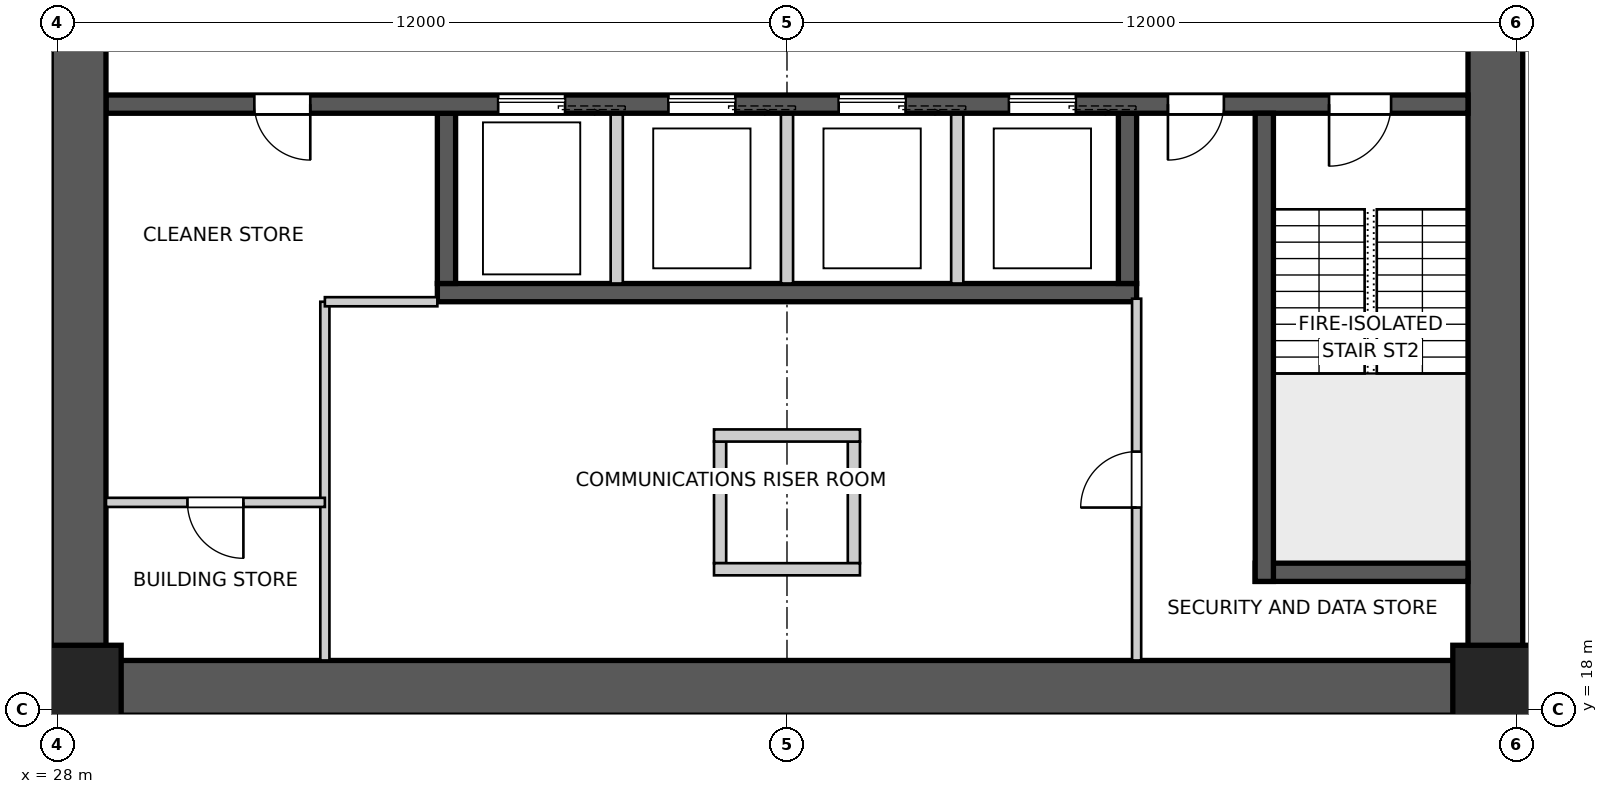
"""IFC4 building model, lengths in metres.
Left out: names, types, materials, properties, quantities, classifications, styles, units other than length and angle.
Written with IfcOpenShell. Run it as: python <this file> out.ifc"""

import sys

from ifc_helpers import new_model, si_unit, direction, frame, frame_2d, origin, origin_2d, place, context, subcontext, project, spatial, polyline, rectangle, outline, extrude, element, fill, save


model = new_model("IFC4")
c1 = context("Model", 3, precision=1e-05, world=origin(), true_north=direction((0.0, 1.0)))
c2 = subcontext(c1, "Body", "Model", "MODEL_VIEW")
j1 = project(units=[si_unit("LENGTHUNIT", "METRE"), si_unit("PLANEANGLEUNIT", "RADIAN")], contexts=[c1])
p1 = place(None, origin())
s1 = spatial("IfcSite", under=j1, at=p1, CompositionType="ELEMENT")
p2 = place(p1, origin())
s2 = spatial("IfcBuilding", under=s1, at=p2, CompositionType="ELEMENT")
p3 = place(p2, frame((0.0, 0.0, -7.4)))
s3 = spatial("IfcBuildingStorey", under=s2, at=p3, CompositionType="ELEMENT", Elevation=-7.4)
p4 = place(p3, frame((51.2, 18.35, -0.4), z_axis=(0.0, 0.0, 1.0), x_axis=(-1.0, 0.0, 0.0)))
e1 = element("IfcWall", 1, at=p4, inside=s3, PredefinedType="SHEAR", context=c2, shape_type="SweptSolid", body=[
    extrude(outline(polyline([(0.0, -0.45), (22.4, -0.45), (22.4, -0.025), (22.85, -0.025), (22.85, 0.025), (22.4, 0.025), (22.4, 0.45), (0.0, 0.45), (0.0, 0.025), (-0.45, 0.025), (-0.45, -0.025), (0.0, -0.025), (0.0, -0.45)])), origin(), (0.0, 0.0, 1.0), 4.1),
])
p5 = place(p3, frame((51.65, 18.8, -0.4), z_axis=(0.0, 0.0, 1.0), x_axis=(0.0, 1.0, 0.0)))
e2 = element("IfcWall", 2, at=p5, inside=s3, PredefinedType="SHEAR", context=c2, shape_type="SweptSolid", body=[
    extrude(outline(polyline([(0.0, -0.45), (22.4, -0.45), (22.4, -0.025), (22.85, -0.025), (22.85, 0.025), (22.4, 0.025), (22.4, 0.45), (0.0, 0.45), (0.0, 0.025), (-0.45, 0.025), (-0.45, -0.025), (0.0, -0.025), (0.0, -0.45)])), origin(), (0.0, 0.0, 1.0), 4.1),
])
p6 = place(p5, frame((11.14, 0.0, 0.4)))
e3 = element("IfcOpeningElement", 3, at=p6, cuts=e2, PredefinedType="OPENING", context=c2, shape_type="SweptSolid", body=[
    extrude(rectangle(XDim=1.02, YDim=2.4, at=frame_2d((0.51, 1.2))), frame((0.0, 0.46, 0.0), z_axis=(0.0, -1.0, 0.0), x_axis=(1.0, 0.0, 0.0)), (0.0, 0.0, 1.0), 0.92),
])
p7 = place(p3, frame((28.35, 41.2, -0.4), z_axis=(0.0, 0.0, 1.0), x_axis=(0.0, -1.0, 0.0)))
e4 = element("IfcWall", 4, at=p7, inside=s3, PredefinedType="SHEAR", context=c2, shape_type="SweptSolid", body=[
    extrude(outline(polyline([(0.0, -0.45), (22.4, -0.45), (22.4, -0.025), (22.85, -0.025), (22.85, 0.025), (22.4, 0.025), (22.4, 0.45), (0.0, 0.45), (0.0, 0.025), (-0.45, 0.025), (-0.45, -0.025), (0.0, -0.025), (0.0, -0.45)])), origin(), (0.0, 0.0, 1.0), 4.1),
])
p8 = place(p7, frame((11.14, 0.0, 0.4)))
e5 = element("IfcOpeningElement", 5, at=p8, cuts=e4, PredefinedType="OPENING", context=c2, shape_type="SweptSolid", body=[
    extrude(rectangle(XDim=1.02, YDim=2.4, at=frame_2d((0.51, 1.2))), frame((0.0, 0.46, 0.0), z_axis=(0.0, -1.0, 0.0), x_axis=(1.0, 0.0, 0.0)), (0.0, 0.0, 1.0), 0.92),
])
p9 = place(p3, frame((51.2, 27.95, -0.4), z_axis=(0.0, 0.0, 1.0), x_axis=(-1.0, 0.0, 0.0)))
e6 = element("IfcWall", 6, at=p9, inside=s3, PredefinedType="SHEAR", context=c2, shape_type="SweptSolid", body=[
    extrude(rectangle(XDim=22.4, YDim=0.3, at=frame_2d((11.2, 0.0))), origin(), (0.0, 0.0, 1.0), 4.1),
])
p10 = place(p9, frame((19.04, 0.0, 0.4)))
e7 = element("IfcOpeningElement", 7, at=p10, cuts=e6, PredefinedType="OPENING", context=c2, shape_type="SweptSolid", body=[
    extrude(rectangle(XDim=0.92, YDim=2.1, at=frame_2d((0.46, 1.05))), frame((0.0, 0.16, 0.0), z_axis=(0.0, -1.0, 0.0), x_axis=(1.0, 0.0, 0.0)), (0.0, 0.0, 1.0), 0.32),
])
p11 = place(p9, frame((1.265, 0.0, 0.4)))
e8 = element("IfcOpeningElement", 8, at=p11, cuts=e6, PredefinedType="OPENING", context=c2, shape_type="SweptSolid", body=[
    extrude(rectangle(XDim=1.02, YDim=2.1, at=frame_2d((0.51, 1.05))), frame((0.0, 0.16, 0.0), z_axis=(0.0, -1.0, 0.0), x_axis=(1.0, 0.0, 0.0)), (0.0, 0.0, 1.0), 0.32),
])
p12 = place(p9, frame((4.015, 0.0, 0.4)))
e9 = element("IfcOpeningElement", 9, at=p12, cuts=e6, PredefinedType="OPENING", context=c2, shape_type="SweptSolid", body=[
    extrude(rectangle(XDim=0.92, YDim=2.1, at=frame_2d((0.46, 1.05))), frame((0.0, 0.16, 0.0), z_axis=(0.0, -1.0, 0.0), x_axis=(1.0, 0.0, 0.0)), (0.0, 0.0, 1.0), 0.32),
])
p13 = place(p9, frame((6.45, 0.0, 0.4)))
e10 = element("IfcOpeningElement", 10, at=p13, cuts=e6, PredefinedType="OPENING", context=c2, shape_type="SweptSolid", body=[
    extrude(rectangle(XDim=1.1, YDim=2.1, at=frame_2d((0.55, 1.05))), frame((0.0, 0.16, 0.0), z_axis=(0.0, -1.0, 0.0), x_axis=(1.0, 0.0, 0.0)), (0.0, 0.0, 1.0), 0.32),
])
p14 = place(p9, frame((9.25, 0.0, 0.4)))
e11 = element("IfcOpeningElement", 11, at=p14, cuts=e6, PredefinedType="OPENING", context=c2, shape_type="SweptSolid", body=[
    extrude(rectangle(XDim=1.1, YDim=2.1, at=frame_2d((0.55, 1.05))), frame((0.0, 0.16, 0.0), z_axis=(0.0, -1.0, 0.0), x_axis=(1.0, 0.0, 0.0)), (0.0, 0.0, 1.0), 0.32),
])
p15 = place(p9, frame((12.05, 0.0, 0.4)))
e12 = element("IfcOpeningElement", 12, at=p15, cuts=e6, PredefinedType="OPENING", context=c2, shape_type="SweptSolid", body=[
    extrude(rectangle(XDim=1.1, YDim=2.1, at=frame_2d((0.55, 1.05))), frame((0.0, 0.16, 0.0), z_axis=(0.0, -1.0, 0.0), x_axis=(1.0, 0.0, 0.0)), (0.0, 0.0, 1.0), 0.32),
])
p16 = place(p9, frame((14.85, 0.0, 0.4)))
e13 = element("IfcOpeningElement", 13, at=p16, cuts=e6, PredefinedType="OPENING", context=c2, shape_type="SweptSolid", body=[
    extrude(rectangle(XDim=1.1, YDim=2.1, at=frame_2d((0.55, 1.05))), frame((0.0, 0.16, 0.0), z_axis=(0.0, -1.0, 0.0), x_axis=(1.0, 0.0, 0.0)), (0.0, 0.0, 1.0), 0.32),
])
p17 = place(p3, frame((45.75, 24.85, -0.4), z_axis=(0.0, 0.0, 1.0), x_axis=(-1.0, 0.0, 0.0)))
e14 = element("IfcWall", 14, at=p17, inside=s3, PredefinedType="SHEAR", context=c2, shape_type="SweptSolid", body=[
    extrude(rectangle(XDim=11.5, YDim=0.3, at=frame_2d((5.75, 0.0))), origin(), (0.0, 0.0, 1.0), 4.1),
])
p18 = place(p3, frame((45.6, 27.8, -0.4), z_axis=(0.0, 0.0, 1.0), x_axis=(0.0, -1.0, 0.0)))
e15 = element("IfcWall", 15, at=p18, inside=s3, PredefinedType="SHEAR", context=c2, shape_type="SweptSolid", body=[
    extrude(rectangle(XDim=2.8, YDim=0.3, at=frame_2d((1.4, 0.0))), origin(), (0.0, 0.0, 1.0), 4.1),
])
for number, where, z_axis, x_axis in (
    (16, (42.8, 27.8, -0.4), (0.0, 0.0, 1.0), (0.0, -1.0, 0.0)),
    (17, (40.0, 27.8, -0.4), (0.0, 0.0, 1.0), (0.0, -1.0, 0.0)),
    (18, (37.2, 27.8, -0.4), (0.0, 0.0, 1.0), (0.0, -1.0, 0.0)),
):
    element("IfcWall", number, at=place(p3, frame(where, z_axis=z_axis, x_axis=x_axis)), inside=s3, PredefinedType="SOLIDWALL", context=c2, shape_type="SweptSolid", body=[
        extrude(rectangle(XDim=2.8, YDim=0.2, at=frame_2d((1.4, 0.0))), origin(), (0.0, 0.0, 1.0), 4.1),
    ])
p19 = place(p3, frame((34.4, 27.8, -0.4), z_axis=(0.0, 0.0, 1.0), x_axis=(0.0, -1.0, 0.0)))
e19 = element("IfcWall", 19, at=p19, inside=s3, PredefinedType="SHEAR", context=c2, shape_type="SweptSolid", body=[
    extrude(rectangle(XDim=2.8, YDim=0.3, at=frame_2d((1.4, 0.0))), origin(), (0.0, 0.0, 1.0), 4.1),
])
p20 = place(p3, frame((47.85, 27.8, -0.4), z_axis=(0.0, 0.0, 1.0), x_axis=(0.0, -1.0, 0.0)))
e20 = element("IfcWall", 20, at=p20, inside=s3, PredefinedType="SHEAR", context=c2, shape_type="SweptSolid", body=[
    extrude(rectangle(XDim=7.7, YDim=0.3, at=frame_2d((3.85, 0.0))), origin(), (0.0, 0.0, 1.0), 4.1),
])
p21 = place(p3, frame((51.2, 20.25, -0.4), z_axis=(0.0, 0.0, 1.0), x_axis=(-1.0, 0.0, 0.0)))
e21 = element("IfcWall", 21, at=p21, inside=s3, PredefinedType="SHEAR", context=c2, shape_type="SweptSolid", body=[
    extrude(rectangle(XDim=3.5, YDim=0.3, at=frame_2d((1.75, 0.0))), origin(), (0.0, 0.0, 1.0), 4.1),
])
for number, where, z_axis, x_axis in (
    (22, (38.9, 22.4, -0.4), (0.0, 0.0, 1.0), (0.0, -1.0, 0.0)),
    (23, (41.1, 22.4, -0.4), (0.0, 0.0, 1.0), (0.0, -1.0, 0.0)),
):
    element("IfcWall", number, at=place(p3, frame(where, z_axis=z_axis, x_axis=x_axis)), inside=s3, PredefinedType="SOLIDWALL", context=c2, shape_type="SweptSolid", body=[
        extrude(rectangle(XDim=2.0, YDim=0.2, at=frame_2d((1.0, 0.0))), origin(), (0.0, 0.0, 1.0), 4.1),
    ])
for number, where, z_axis, x_axis in (
    (24, (38.8, 22.5, -0.4), (0.0, 0.0, 1.0), (1.0, 0.0, 0.0)),
    (25, (38.8, 20.3, -0.4), (0.0, 0.0, 1.0), (1.0, 0.0, 0.0)),
):
    element("IfcWall", number, at=place(p3, frame(where, z_axis=z_axis, x_axis=x_axis)), inside=s3, PredefinedType="SOLIDWALL", context=c2, shape_type="SweptSolid", body=[
        extrude(rectangle(XDim=2.4, YDim=0.2, at=frame_2d((1.2, 0.0))), origin(), (0.0, 0.0, 1.0), 4.1),
    ])
for number, where, z_axis, x_axis in (
    (26, (28.35, 18.35, -0.4), (0.0, 0.0, 1.0), (1.0, 0.0, 0.0)),
    (27, (51.65, 18.35, -0.4), (0.0, 0.0, 1.0), (1.0, 0.0, 0.0)),
):
    element("IfcColumn", number, at=place(p3, frame(where, z_axis=z_axis, x_axis=x_axis)), inside=s3, PredefinedType="COLUMN", context=c2, shape_type="SweptSolid", body=[
        extrude(rectangle(XDim=1.4, YDim=1.4, at=origin_2d()), origin(), (0.0, 0.0, 1.0), 4.1),
    ])
p22 = place(p3, frame((45.75, 18.8, 0.0), z_axis=(0.0, 0.0, 1.0), x_axis=(0.0, 1.0, 0.0)))
e28 = element("IfcWall", 28, at=p22, inside=s3, PredefinedType="SOLIDWALL", context=c2, shape_type="SweptSolid", body=[
    extrude(rectangle(XDim=5.95, YDim=0.15, at=frame_2d((2.975, 0.0))), origin(), (0.0, 0.0, 1.0), 3.35),
])
p23 = place(p22, frame((2.515, 0.0, 0.0)))
e29 = element("IfcOpeningElement", 29, at=p23, cuts=e28, PredefinedType="OPENING", context=c2, shape_type="SweptSolid", body=[
    extrude(rectangle(XDim=0.92, YDim=2.1, at=frame_2d((0.46, 1.05))), frame((0.0, 0.085, 0.0), z_axis=(0.0, -1.0, 0.0), x_axis=(1.0, 0.0, 0.0)), (0.0, 0.0, 1.0), 0.17),
])
p24 = place(p3, frame((32.4, 18.8, 0.0), z_axis=(0.0, 0.0, 1.0), x_axis=(0.0, 1.0, 0.0)))
e30 = element("IfcWall", 30, at=p24, inside=s3, PredefinedType="SOLIDWALL", context=c2, shape_type="SweptSolid", body=[
    extrude(rectangle(XDim=5.9, YDim=0.15, at=frame_2d((2.95, 0.0))), origin(), (0.0, 0.0, 1.0), 3.35),
])
p25 = place(p3, frame((32.4, 24.7, 0.0), z_axis=(0.0, 0.0, 1.0), x_axis=(1.0, 0.0, 0.0)))
e31 = element("IfcWall", 31, at=p25, inside=s3, PredefinedType="SOLIDWALL", context=c2, shape_type="SweptSolid", body=[
    extrude(rectangle(XDim=1.85, YDim=0.15, at=frame_2d((0.925, 0.0))), origin(), (0.0, 0.0, 1.0), 3.35),
])
p26 = place(p3, frame((32.4, 21.4, 0.0), z_axis=(0.0, 0.0, 1.0), x_axis=(-1.0, 0.0, 0.0)))
e32 = element("IfcWall", 32, at=p26, inside=s3, PredefinedType="SOLIDWALL", context=c2, shape_type="SweptSolid", body=[
    extrude(rectangle(XDim=3.6, YDim=0.15, at=frame_2d((1.8, 0.0))), origin(), (0.0, 0.0, 1.0), 3.35),
])
p27 = place(p26, frame((1.34, 0.0, 0.0)))
e33 = element("IfcOpeningElement", 33, at=p27, cuts=e32, PredefinedType="OPENING", context=c2, shape_type="SweptSolid", body=[
    extrude(rectangle(XDim=0.92, YDim=2.1, at=frame_2d((0.46, 1.05))), frame((0.0, 0.085, 0.0), z_axis=(0.0, -1.0, 0.0), x_axis=(1.0, 0.0, 0.0)), (0.0, 0.0, 1.0), 0.17),
])
p28 = place(p10, origin())
e34 = element("IfcDoor", 34, at=p28, inside=s3, OperationType="SINGLE_SWING_LEFT", PredefinedType="DOOR", context=c2, shape_type="SweptSolid", body=[
    extrude(rectangle(XDim=0.92, YDim=2.1, at=frame_2d((0.46, 1.05))), frame((0.0, 0.025, 0.0), z_axis=(0.0, -1.0, 0.0), x_axis=(1.0, 0.0, 0.0)), (0.0, 0.0, 1.0), 0.05),
])
fill(e7, e34)
p29 = place(p11, origin())
e35 = element("IfcDoor", 35, at=p29, inside=s3, OperationType="SINGLE_SWING_RIGHT", PredefinedType="DOOR", context=c2, shape_type="SweptSolid", body=[
    extrude(rectangle(XDim=1.02, YDim=2.1, at=frame_2d((0.51, 1.05))), frame((0.0, 0.025, 0.0), z_axis=(0.0, -1.0, 0.0), x_axis=(1.0, 0.0, 0.0)), (0.0, 0.0, 1.0), 0.05),
])
fill(e8, e35)
p30 = place(p12, origin())
e36 = element("IfcDoor", 36, at=p30, inside=s3, OperationType="SINGLE_SWING_RIGHT", PredefinedType="DOOR", context=c2, shape_type="SweptSolid", body=[
    extrude(rectangle(XDim=0.92, YDim=2.1, at=frame_2d((0.46, 1.05))), frame((0.0, 0.025, 0.0), z_axis=(0.0, -1.0, 0.0), x_axis=(1.0, 0.0, 0.0)), (0.0, 0.0, 1.0), 0.05),
])
fill(e9, e36)
p31 = place(p27, origin())
e37 = element("IfcDoor", 37, at=p31, inside=s3, OperationType="SINGLE_SWING_LEFT", PredefinedType="DOOR", context=c2, shape_type="SweptSolid", body=[
    extrude(rectangle(XDim=0.92, YDim=2.1, at=frame_2d((0.46, 1.05))), frame((0.0, 0.025, 0.0), z_axis=(0.0, -1.0, 0.0), x_axis=(1.0, 0.0, 0.0)), (0.0, 0.0, 1.0), 0.05),
])
fill(e33, e37)
p32 = place(p23, origin())
e38 = element("IfcDoor", 38, at=p32, inside=s3, OperationType="SINGLE_SWING_LEFT", PredefinedType="DOOR", context=c2, shape_type="SweptSolid", body=[
    extrude(rectangle(XDim=0.92, YDim=2.1, at=frame_2d((0.46, 1.05))), frame((0.0, 0.025, 0.0), z_axis=(0.0, -1.0, 0.0), x_axis=(1.0, 0.0, 0.0)), (0.0, 0.0, 1.0), 0.05),
])
fill(e29, e38)
p33 = place(p13, origin())
e39 = element("IfcDoor", 39, at=p33, inside=s3, OperationType="SLIDING_TO_LEFT", PredefinedType="DOOR", context=c2, shape_type="SweptSolid", body=[
    extrude(rectangle(XDim=1.1, YDim=2.1, at=frame_2d((0.55, 1.05))), frame((0.0, 0.025, 0.0), z_axis=(0.0, -1.0, 0.0), x_axis=(1.0, 0.0, 0.0)), (0.0, 0.0, 1.0), 0.05),
])
fill(e10, e39)
p34 = place(p14, origin())
e40 = element("IfcDoor", 40, at=p34, inside=s3, OperationType="SLIDING_TO_LEFT", PredefinedType="DOOR", context=c2, shape_type="SweptSolid", body=[
    extrude(rectangle(XDim=1.1, YDim=2.1, at=frame_2d((0.55, 1.05))), frame((0.0, 0.025, 0.0), z_axis=(0.0, -1.0, 0.0), x_axis=(1.0, 0.0, 0.0)), (0.0, 0.0, 1.0), 0.05),
])
fill(e11, e40)
p35 = place(p15, origin())
e41 = element("IfcDoor", 41, at=p35, inside=s3, OperationType="SLIDING_TO_LEFT", PredefinedType="DOOR", context=c2, shape_type="SweptSolid", body=[
    extrude(rectangle(XDim=1.1, YDim=2.1, at=frame_2d((0.55, 1.05))), frame((0.0, 0.025, 0.0), z_axis=(0.0, -1.0, 0.0), x_axis=(1.0, 0.0, 0.0)), (0.0, 0.0, 1.0), 0.05),
])
fill(e12, e41)
p36 = place(p16, origin())
e42 = element("IfcDoor", 42, at=p36, inside=s3, OperationType="SLIDING_TO_LEFT", PredefinedType="DOOR", context=c2, shape_type="SweptSolid", body=[
    extrude(rectangle(XDim=1.1, YDim=2.1, at=frame_2d((0.55, 1.05))), frame((0.0, 0.025, 0.0), z_axis=(0.0, -1.0, 0.0), x_axis=(1.0, 0.0, 0.0)), (0.0, 0.0, 1.0), 0.05),
])
fill(e13, e42)
save(model, sys.argv[1])
